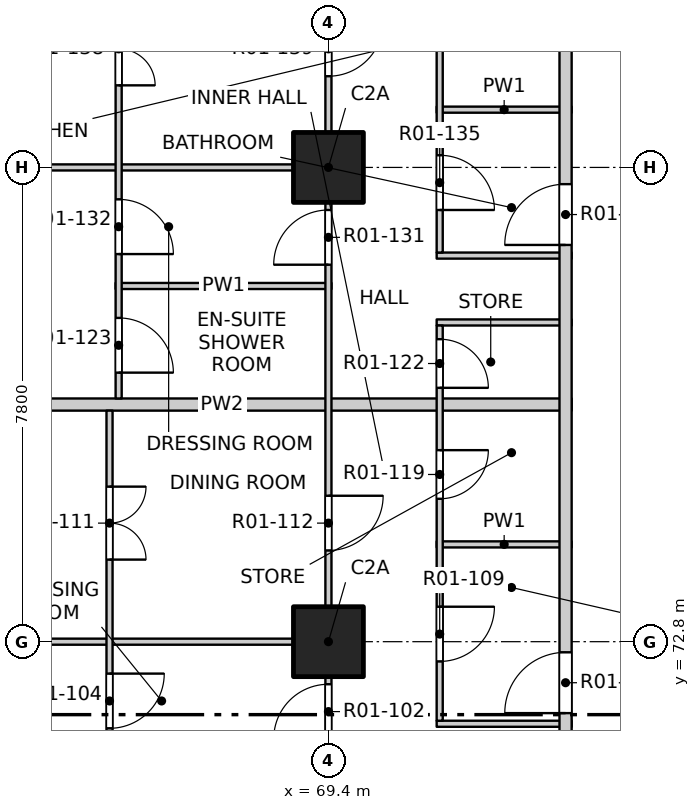
"""IFC4 building model, lengths in metres.
Left out: names, types, materials, properties, quantities, classifications, styles, units other than length and angle.
Written with IfcOpenShell. Run it as: python <this file> out.ifc"""

import sys

from ifc_helpers import new_model, si_unit, direction, frame, frame_2d, origin, origin_2d, place, context, subcontext, project, spatial, rectangle, extrude, element, fill, save


model = new_model("IFC4")
c1 = context("Model", 3, precision=1e-05, world=origin(), true_north=direction((0.0, 1.0)))
c2 = subcontext(c1, "Body", "Model", "MODEL_VIEW")
j1 = project(units=[si_unit("LENGTHUNIT", "METRE"), si_unit("PLANEANGLEUNIT", "RADIAN")], contexts=[c1])
p1 = place(None, origin())
s1 = spatial("IfcSite", under=j1, at=p1, CompositionType="ELEMENT")
p2 = place(p1, origin())
s2 = spatial("IfcBuilding", under=s1, at=p2, CompositionType="ELEMENT")
p3 = place(p2, frame((0.0, 0.0, 26.3)))
s3 = spatial("IfcBuildingStorey", under=s2, at=p3, CompositionType="ELEMENT", Elevation=26.3)
for number, where, z_axis, x_axis in (
    (1, (69.4, 72.8, -0.25), (0.0, 0.0, 1.0), (1.0, 0.0, 0.0)),
    (2, (69.4, 80.6, -0.25), (0.0, 0.0, 1.0), (1.0, 0.0, 0.0)),
):
    element("IfcColumn", number, at=place(p3, frame(where, z_axis=z_axis, x_axis=x_axis)), inside=s3, PredefinedType="COLUMN", context=c2, shape_type="SweptSolid", body=[
        extrude(rectangle(XDim=1.15, YDim=1.15, at=origin_2d()), origin(), (0.0, 0.0, 1.0), 3.4),
    ])
p4 = place(p3, frame((71.18, 71.45, 0.0), z_axis=(0.0, 0.0, 1.0), x_axis=(1.0, 0.0, 0.0)))
e3 = element("IfcWall", 3, at=p4, inside=s3, PredefinedType="PARTITIONING", context=c2, shape_type="SweptSolid", body=[
    extrude(rectangle(XDim=2.22, YDim=0.1, at=frame_2d((1.11, 0.0))), origin(), (0.0, 0.0, 1.0), 3.15),
])
p5 = place(p3, frame((61.9, 72.8, 0.0), z_axis=(0.0, 0.0, 1.0), x_axis=(1.0, 0.0, 0.0)))
e4 = element("IfcWall", 4, at=p5, inside=s3, PredefinedType="PARTITIONING", context=c2, shape_type="SweptSolid", body=[
    extrude(rectangle(XDim=7.55, YDim=0.1, at=frame_2d((3.775, 0.0))), origin(), (0.0, 0.0, 1.0), 2.55),
])
p6 = place(p3, frame((71.18, 74.4, 0.0), z_axis=(0.0, 0.0, 1.0), x_axis=(1.0, 0.0, 0.0)))
e5 = element("IfcWall", 5, at=p6, inside=s3, PredefinedType="PARTITIONING", context=c2, shape_type="SweptSolid", body=[
    extrude(rectangle(XDim=2.22, YDim=0.1, at=frame_2d((1.11, 0.0))), origin(), (0.0, 0.0, 1.0), 3.15),
])
p7 = place(p3, frame((61.9, 76.7, 0.0), z_axis=(0.0, 0.0, 1.0), x_axis=(1.0, 0.0, 0.0)))
e6 = element("IfcWall", 6, at=p7, inside=s3, PredefinedType="PARTITIONING", context=c2, shape_type="SweptSolid", body=[
    extrude(rectangle(XDim=11.5, YDim=0.2, at=frame_2d((5.75, 0.0))), origin(), (0.0, 0.0, 1.0), 3.15),
])
p8 = place(p3, frame((71.18, 78.05, 0.0), z_axis=(0.0, 0.0, 1.0), x_axis=(1.0, 0.0, 0.0)))
e7 = element("IfcWall", 7, at=p8, inside=s3, PredefinedType="PARTITIONING", context=c2, shape_type="SweptSolid", body=[
    extrude(rectangle(XDim=2.22, YDim=0.1, at=frame_2d((1.11, 0.0))), origin(), (0.0, 0.0, 1.0), 3.15),
])
p9 = place(p3, frame((65.9, 78.65, 0.0), z_axis=(0.0, 0.0, 1.0), x_axis=(1.0, 0.0, 0.0)))
e8 = element("IfcWall", 8, at=p9, inside=s3, PredefinedType="PARTITIONING", context=c2, shape_type="SweptSolid", body=[
    extrude(rectangle(XDim=3.55, YDim=0.1, at=frame_2d((1.775, 0.0))), origin(), (0.0, 0.0, 1.0), 3.15),
])
p10 = place(p3, frame((71.18, 79.15, 0.0), z_axis=(0.0, 0.0, 1.0), x_axis=(1.0, 0.0, 0.0)))
e9 = element("IfcWall", 9, at=p10, inside=s3, PredefinedType="PARTITIONING", context=c2, shape_type="SweptSolid", body=[
    extrude(rectangle(XDim=2.22, YDim=0.1, at=frame_2d((1.11, 0.0))), origin(), (0.0, 0.0, 1.0), 3.15),
])
p11 = place(p3, frame((61.9, 80.6, 0.0), z_axis=(0.0, 0.0, 1.0), x_axis=(1.0, 0.0, 0.0)))
e10 = element("IfcWall", 10, at=p11, inside=s3, PredefinedType="PARTITIONING", context=c2, shape_type="SweptSolid", body=[
    extrude(rectangle(XDim=7.55, YDim=0.1, at=frame_2d((3.775, 0.0))), origin(), (0.0, 0.0, 1.0), 2.55),
])
p12 = place(p3, frame((71.18, 81.55, 0.0), z_axis=(0.0, 0.0, 1.0), x_axis=(1.0, 0.0, 0.0)))
e11 = element("IfcWall", 11, at=p12, inside=s3, PredefinedType="PARTITIONING", context=c2, shape_type="SweptSolid", body=[
    extrude(rectangle(XDim=2.22, YDim=0.1, at=frame_2d((1.11, 0.0))), origin(), (0.0, 0.0, 1.0), 3.15),
])
p13 = place(p3, frame((65.8, 69.0, 0.0), z_axis=(0.0, 0.0, 1.0), x_axis=(0.0, 1.0, 0.0)))
e12 = element("IfcWall", 12, at=p13, inside=s3, PredefinedType="PARTITIONING", context=c2, shape_type="SweptSolid", body=[
    extrude(rectangle(XDim=7.6, YDim=0.1, at=frame_2d((3.8, 0.0))), origin(), (0.0, 0.0, 1.0), 3.15),
])
p14 = place(p13, frame((0.425, 0.0, 0.0)))
e13 = element("IfcOpeningElement", 13, at=p14, cuts=e12, PredefinedType="OPENING", context=c2, shape_type="SweptSolid", body=[
    extrude(rectangle(XDim=0.9, YDim=2.1, at=frame_2d((0.45, 1.05))), frame((0.0, 0.06, 0.0), z_axis=(0.0, -1.0, 0.0), x_axis=(1.0, 0.0, 0.0)), (0.0, 0.0, 1.0), 0.12),
])
p15 = place(p13, frame((2.375, 0.0, 0.0)))
e14 = element("IfcOpeningElement", 14, at=p15, cuts=e12, PredefinedType="OPENING", context=c2, shape_type="SweptSolid", body=[
    extrude(rectangle(XDim=0.9, YDim=2.1, at=frame_2d((0.45, 1.05))), frame((0.0, 0.06, 0.0), z_axis=(0.0, -1.0, 0.0), x_axis=(1.0, 0.0, 0.0)), (0.0, 0.0, 1.0), 0.12),
])
p16 = place(p13, frame((5.15, 0.0, 0.0)))
e15 = element("IfcOpeningElement", 15, at=p16, cuts=e12, PredefinedType="OPENING", context=c2, shape_type="SweptSolid", body=[
    extrude(rectangle(XDim=1.2, YDim=2.1, at=frame_2d((0.6, 1.05))), frame((0.0, 0.06, 0.0), z_axis=(0.0, -1.0, 0.0), x_axis=(1.0, 0.0, 0.0)), (0.0, 0.0, 1.0), 0.12),
])
p17 = place(p3, frame((65.95, 76.8, 0.0), z_axis=(0.0, 0.0, 1.0), x_axis=(0.0, 1.0, 0.0)))
e16 = element("IfcWall", 16, at=p17, inside=s3, PredefinedType="PARTITIONING", context=c2, shape_type="SweptSolid", body=[
    extrude(rectangle(XDim=11.3, YDim=0.1, at=frame_2d((5.65, 0.0))), origin(), (0.0, 0.0, 1.0), 3.15),
])
p18 = place(p17, frame((0.425, 0.0, 0.0)))
e17 = element("IfcOpeningElement", 17, at=p18, cuts=e16, PredefinedType="OPENING", context=c2, shape_type="SweptSolid", body=[
    extrude(rectangle(XDim=0.9, YDim=2.1, at=frame_2d((0.45, 1.05))), frame((0.0, 0.06, 0.0), z_axis=(0.0, -1.0, 0.0), x_axis=(1.0, 0.0, 0.0)), (0.0, 0.0, 1.0), 0.12),
])
p19 = place(p17, frame((2.375, 0.0, 0.0)))
e18 = element("IfcOpeningElement", 18, at=p19, cuts=e16, PredefinedType="OPENING", context=c2, shape_type="SweptSolid", body=[
    extrude(rectangle(XDim=0.9, YDim=2.1, at=frame_2d((0.45, 1.05))), frame((0.0, 0.06, 0.0), z_axis=(0.0, -1.0, 0.0), x_axis=(1.0, 0.0, 0.0)), (0.0, 0.0, 1.0), 0.12),
])
p20 = place(p17, frame((5.15, 0.0, 0.0)))
e19 = element("IfcOpeningElement", 19, at=p20, cuts=e16, PredefinedType="OPENING", context=c2, shape_type="SweptSolid", body=[
    extrude(rectangle(XDim=1.2, YDim=2.1, at=frame_2d((0.6, 1.05))), frame((0.0, 0.06, 0.0), z_axis=(0.0, -1.0, 0.0), x_axis=(1.0, 0.0, 0.0)), (0.0, 0.0, 1.0), 0.12),
])
p21 = place(p17, frame((9.05, 0.0, 0.0)))
e20 = element("IfcOpeningElement", 20, at=p21, cuts=e16, PredefinedType="OPENING", context=c2, shape_type="SweptSolid", body=[
    extrude(rectangle(XDim=1.2, YDim=2.1, at=frame_2d((0.6, 1.05))), frame((0.0, 0.06, 0.0), z_axis=(0.0, -1.0, 0.0), x_axis=(1.0, 0.0, 0.0)), (0.0, 0.0, 1.0), 0.12),
])
p22 = place(p3, frame((69.4, 49.4, 0.0), z_axis=(0.0, 0.0, 1.0), x_axis=(0.0, 1.0, 0.0)))
e21 = element("IfcWall", 21, at=p22, inside=s3, PredefinedType="PARTITIONING", context=c2, shape_type="SweptSolid", body=[
    extrude(rectangle(XDim=31.2, YDim=0.1, at=frame_2d((15.6, 0.0))), origin(), (0.0, 0.0, 1.0), 3.15),
])
p23 = place(p22, frame((1.5, 0.0, 0.0)))
e22 = element("IfcOpeningElement", 22, at=p23, cuts=e21, PredefinedType="OPENING", context=c2, shape_type="SweptSolid", body=[
    extrude(rectangle(XDim=0.9, YDim=2.1, at=frame_2d((0.45, 1.05))), frame((0.0, 0.06, 0.0), z_axis=(0.0, -1.0, 0.0), x_axis=(1.0, 0.0, 0.0)), (0.0, 0.0, 1.0), 0.12),
])
p24 = place(p22, frame((6.225, 0.0, 0.0)))
e23 = element("IfcOpeningElement", 23, at=p24, cuts=e21, PredefinedType="OPENING", context=c2, shape_type="SweptSolid", body=[
    extrude(rectangle(XDim=0.9, YDim=2.1, at=frame_2d((0.45, 1.05))), frame((0.0, 0.06, 0.0), z_axis=(0.0, -1.0, 0.0), x_axis=(1.0, 0.0, 0.0)), (0.0, 0.0, 1.0), 0.12),
])
p25 = place(p22, frame((10.275, 0.0, 0.0)))
e24 = element("IfcOpeningElement", 24, at=p25, cuts=e21, PredefinedType="OPENING", context=c2, shape_type="SweptSolid", body=[
    extrude(rectangle(XDim=0.9, YDim=2.1, at=frame_2d((0.45, 1.05))), frame((0.0, 0.06, 0.0), z_axis=(0.0, -1.0, 0.0), x_axis=(1.0, 0.0, 0.0)), (0.0, 0.0, 1.0), 0.12),
])
p26 = place(p22, frame((13.2, 0.0, 0.0)))
e25 = element("IfcOpeningElement", 25, at=p26, cuts=e21, PredefinedType="OPENING", context=c2, shape_type="SweptSolid", body=[
    extrude(rectangle(XDim=0.9, YDim=2.1, at=frame_2d((0.45, 1.05))), frame((0.0, 0.06, 0.0), z_axis=(0.0, -1.0, 0.0), x_axis=(1.0, 0.0, 0.0)), (0.0, 0.0, 1.0), 0.12),
])
p27 = place(p22, frame((18.075, 0.0, 0.0)))
e26 = element("IfcOpeningElement", 26, at=p27, cuts=e21, PredefinedType="OPENING", context=c2, shape_type="SweptSolid", body=[
    extrude(rectangle(XDim=0.9, YDim=2.1, at=frame_2d((0.45, 1.05))), frame((0.0, 0.06, 0.0), z_axis=(0.0, -1.0, 0.0), x_axis=(1.0, 0.0, 0.0)), (0.0, 0.0, 1.0), 0.12),
])
p28 = place(p22, frame((21.8, 0.0, 0.0)))
e27 = element("IfcOpeningElement", 27, at=p28, cuts=e21, PredefinedType="OPENING", context=c2, shape_type="SweptSolid", body=[
    extrude(rectangle(XDim=0.9, YDim=2.1, at=frame_2d((0.45, 1.05))), frame((0.0, 0.06, 0.0), z_axis=(0.0, -1.0, 0.0), x_axis=(1.0, 0.0, 0.0)), (0.0, 0.0, 1.0), 0.12),
])
p29 = place(p22, frame((24.9, 0.0, 0.0)))
e28 = element("IfcOpeningElement", 28, at=p29, cuts=e21, PredefinedType="OPENING", context=c2, shape_type="SweptSolid", body=[
    extrude(rectangle(XDim=0.9, YDim=2.1, at=frame_2d((0.45, 1.05))), frame((0.0, 0.06, 0.0), z_axis=(0.0, -1.0, 0.0), x_axis=(1.0, 0.0, 0.0)), (0.0, 0.0, 1.0), 0.12),
])
p30 = place(p22, frame((29.6, 0.0, 0.0)))
e29 = element("IfcOpeningElement", 29, at=p30, cuts=e21, PredefinedType="OPENING", context=c2, shape_type="SweptSolid", body=[
    extrude(rectangle(XDim=0.9, YDim=2.1, at=frame_2d((0.45, 1.05))), frame((0.0, 0.06, 0.0), z_axis=(0.0, -1.0, 0.0), x_axis=(1.0, 0.0, 0.0)), (0.0, 0.0, 1.0), 0.12),
])
p31 = place(p3, frame((69.4, 80.6, 0.0), z_axis=(0.0, 0.0, 1.0), x_axis=(0.0, 1.0, 0.0)))
e30 = element("IfcWall", 30, at=p31, inside=s3, PredefinedType="PARTITIONING", context=c2, shape_type="SweptSolid", body=[
    extrude(rectangle(XDim=7.5, YDim=0.1, at=frame_2d((3.75, 0.0))), origin(), (0.0, 0.0, 1.0), 2.55),
])
p32 = place(p31, frame((1.5, 0.0, 0.0)))
e31 = element("IfcOpeningElement", 31, at=p32, cuts=e30, PredefinedType="OPENING", context=c2, shape_type="SweptSolid", body=[
    extrude(rectangle(XDim=0.9, YDim=2.1, at=frame_2d((0.45, 1.05))), frame((0.0, 0.06, 0.0), z_axis=(0.0, -1.0, 0.0), x_axis=(1.0, 0.0, 0.0)), (0.0, 0.0, 1.0), 0.12),
])
p33 = place(p31, frame((5.4, 0.0, 0.0)))
e32 = element("IfcOpeningElement", 32, at=p33, cuts=e30, PredefinedType="OPENING", context=c2, shape_type="SweptSolid", body=[
    extrude(rectangle(XDim=0.9, YDim=2.1, at=frame_2d((0.45, 1.05))), frame((0.0, 0.06, 0.0), z_axis=(0.0, -1.0, 0.0), x_axis=(1.0, 0.0, 0.0)), (0.0, 0.0, 1.0), 0.12),
])
p34 = place(p3, frame((71.23, 71.5, 0.0), z_axis=(0.0, 0.0, 1.0), x_axis=(0.0, 1.0, 0.0)))
e33 = element("IfcWall", 33, at=p34, inside=s3, PredefinedType="PARTITIONING", context=c2, shape_type="SweptSolid", body=[
    extrude(rectangle(XDim=6.5, YDim=0.1, at=frame_2d((3.25, 0.0))), origin(), (0.0, 0.0, 1.0), 3.15),
])
p35 = place(p34, frame((0.975, 0.0, 0.0)))
e34 = element("IfcOpeningElement", 34, at=p35, cuts=e33, PredefinedType="OPENING", context=c2, shape_type="SweptSolid", body=[
    extrude(rectangle(XDim=0.9, YDim=2.1, at=frame_2d((0.45, 1.05))), frame((0.0, 0.06, 0.0), z_axis=(0.0, -1.0, 0.0), x_axis=(1.0, 0.0, 0.0)), (0.0, 0.0, 1.0), 0.12),
])
p36 = place(p34, frame((3.65, 0.0, 0.0)))
e35 = element("IfcOpeningElement", 35, at=p36, cuts=e33, PredefinedType="OPENING", context=c2, shape_type="SweptSolid", body=[
    extrude(rectangle(XDim=0.8, YDim=2.1, at=frame_2d((0.4, 1.05))), frame((0.0, 0.06, 0.0), z_axis=(0.0, -1.0, 0.0), x_axis=(1.0, 0.0, 0.0)), (0.0, 0.0, 1.0), 0.12),
])
p37 = place(p34, frame((5.475, 0.0, 0.0)))
e36 = element("IfcOpeningElement", 36, at=p37, cuts=e33, PredefinedType="OPENING", context=c2, shape_type="SweptSolid", body=[
    extrude(rectangle(XDim=0.8, YDim=2.1, at=frame_2d((0.4, 1.05))), frame((0.0, 0.06, 0.0), z_axis=(0.0, -1.0, 0.0), x_axis=(1.0, 0.0, 0.0)), (0.0, 0.0, 1.0), 0.12),
])
p38 = place(p3, frame((71.23, 79.2, 0.0), z_axis=(0.0, 0.0, 1.0), x_axis=(0.0, 1.0, 0.0)))
e37 = element("IfcWall", 37, at=p38, inside=s3, PredefinedType="PARTITIONING", context=c2, shape_type="SweptSolid", body=[
    extrude(rectangle(XDim=5.25, YDim=0.1, at=frame_2d((2.625, 0.0))), origin(), (0.0, 0.0, 1.0), 3.15),
])
p39 = place(p38, frame((0.7, 0.0, 0.0)))
e38 = element("IfcOpeningElement", 38, at=p39, cuts=e37, PredefinedType="OPENING", context=c2, shape_type="SweptSolid", body=[
    extrude(rectangle(XDim=0.9, YDim=2.1, at=frame_2d((0.45, 1.05))), frame((0.0, 0.06, 0.0), z_axis=(0.0, -1.0, 0.0), x_axis=(1.0, 0.0, 0.0)), (0.0, 0.0, 1.0), 0.12),
])
p40 = place(p38, frame((3.375, 0.0, 0.0)))
e39 = element("IfcOpeningElement", 39, at=p40, cuts=e37, PredefinedType="OPENING", context=c2, shape_type="SweptSolid", body=[
    extrude(rectangle(XDim=0.9, YDim=2.1, at=frame_2d((0.45, 1.05))), frame((0.0, 0.06, 0.0), z_axis=(0.0, -1.0, 0.0), x_axis=(1.0, 0.0, 0.0)), (0.0, 0.0, 1.0), 0.12),
])
p41 = place(p3, frame((73.3, 53.4, 0.0), z_axis=(0.0, 0.0, 1.0), x_axis=(0.0, 1.0, 0.0)))
e40 = element("IfcWall", 40, at=p41, inside=s3, PredefinedType="PARTITIONING", context=c2, shape_type="SweptSolid", body=[
    extrude(rectangle(XDim=31.0, YDim=0.2, at=frame_2d((15.5, 0.0))), origin(), (0.0, 0.0, 1.0), 3.15),
])
p42 = place(p41, frame((2.325, 0.0, 0.0)))
e41 = element("IfcOpeningElement", 41, at=p42, cuts=e40, PredefinedType="OPENING", context=c2, shape_type="SweptSolid", body=[
    extrude(rectangle(XDim=1.0, YDim=2.1, at=frame_2d((0.5, 1.05))), frame((0.0, 0.11, 0.0), z_axis=(0.0, -1.0, 0.0), x_axis=(1.0, 0.0, 0.0)), (0.0, 0.0, 1.0), 0.22),
])
p43 = place(p41, frame((10.725, 0.0, 0.0)))
e42 = element("IfcOpeningElement", 42, at=p43, cuts=e40, PredefinedType="OPENING", context=c2, shape_type="SweptSolid", body=[
    extrude(rectangle(XDim=1.0, YDim=2.1, at=frame_2d((0.5, 1.05))), frame((0.0, 0.11, 0.0), z_axis=(0.0, -1.0, 0.0), x_axis=(1.0, 0.0, 0.0)), (0.0, 0.0, 1.0), 0.22),
])
p44 = place(p41, frame((18.225, 0.0, 0.0)))
e43 = element("IfcOpeningElement", 43, at=p44, cuts=e40, PredefinedType="OPENING", context=c2, shape_type="SweptSolid", body=[
    extrude(rectangle(XDim=1.0, YDim=2.1, at=frame_2d((0.5, 1.05))), frame((0.0, 0.11, 0.0), z_axis=(0.0, -1.0, 0.0), x_axis=(1.0, 0.0, 0.0)), (0.0, 0.0, 1.0), 0.22),
])
p45 = place(p41, frame((25.925, 0.0, 0.0)))
e44 = element("IfcOpeningElement", 44, at=p45, cuts=e40, PredefinedType="OPENING", context=c2, shape_type="SweptSolid", body=[
    extrude(rectangle(XDim=1.0, YDim=2.1, at=frame_2d((0.5, 1.05))), frame((0.0, 0.11, 0.0), z_axis=(0.0, -1.0, 0.0), x_axis=(1.0, 0.0, 0.0)), (0.0, 0.0, 1.0), 0.22),
])
p46 = place(p28, origin())
e45 = element("IfcDoor", 45, at=p46, inside=s3, OperationType="SINGLE_SWING_LEFT", PredefinedType="DOOR", context=c2, shape_type="SweptSolid", body=[
    extrude(rectangle(XDim=0.9, YDim=2.1, at=frame_2d((0.45, 1.05))), frame((0.0, 0.025, 0.0), z_axis=(0.0, -1.0, 0.0), x_axis=(1.0, 0.0, 0.0)), (0.0, 0.0, 1.0), 0.05),
])
fill(e27, e45)
p47 = place(p15, origin())
e46 = element("IfcDoor", 46, at=p47, inside=s3, OperationType="SINGLE_SWING_LEFT", PredefinedType="DOOR", context=c2, shape_type="SweptSolid", body=[
    extrude(rectangle(XDim=0.9, YDim=2.1, at=frame_2d((0.45, 1.05))), frame((0.0, 0.025, 0.0), z_axis=(0.0, -1.0, 0.0), x_axis=(1.0, 0.0, 0.0)), (0.0, 0.0, 1.0), 0.05),
])
fill(e14, e46)
p48 = place(p44, origin())
e47 = element("IfcDoor", 47, at=p48, inside=s3, OperationType="SINGLE_SWING_RIGHT", PredefinedType="DOOR", context=c2, shape_type="SweptSolid", body=[
    extrude(rectangle(XDim=1.0, YDim=2.1, at=frame_2d((0.5, 1.05))), frame((0.0, 0.025, 0.0), z_axis=(0.0, -1.0, 0.0), x_axis=(1.0, 0.0, 0.0)), (0.0, 0.0, 1.0), 0.05),
])
fill(e43, e47)
p49 = place(p35, origin())
e48 = element("IfcDoor", 48, at=p49, inside=s3, OperationType="SINGLE_SWING_LEFT", PredefinedType="DOOR", context=c2, shape_type="SweptSolid", body=[
    extrude(rectangle(XDim=0.9, YDim=2.1, at=frame_2d((0.45, 1.05))), frame((0.0, 0.025, 0.0), z_axis=(0.0, -1.0, 0.0), x_axis=(1.0, 0.0, 0.0)), (0.0, 0.0, 1.0), 0.05),
])
fill(e34, e48)
p50 = place(p16, origin())
e49 = element("IfcDoor", 49, at=p50, inside=s3, OperationType="DOUBLE_DOOR_SINGLE_SWING", PredefinedType="DOOR", context=c2, shape_type="SweptSolid", body=[
    extrude(rectangle(XDim=1.2, YDim=2.1, at=frame_2d((0.6, 1.05))), frame((0.0, 0.025, 0.0), z_axis=(0.0, -1.0, 0.0), x_axis=(1.0, 0.0, 0.0)), (0.0, 0.0, 1.0), 0.05),
])
fill(e15, e49)
p51 = place(p29, origin())
e50 = element("IfcDoor", 50, at=p51, inside=s3, OperationType="SINGLE_SWING_LEFT", PredefinedType="DOOR", context=c2, shape_type="SweptSolid", body=[
    extrude(rectangle(XDim=0.9, YDim=2.1, at=frame_2d((0.45, 1.05))), frame((0.0, 0.025, 0.0), z_axis=(0.0, -1.0, 0.0), x_axis=(1.0, 0.0, 0.0)), (0.0, 0.0, 1.0), 0.05),
])
fill(e28, e50)
p52 = place(p36, origin())
e51 = element("IfcDoor", 51, at=p52, inside=s3, OperationType="SINGLE_SWING_LEFT", PredefinedType="DOOR", context=c2, shape_type="SweptSolid", body=[
    extrude(rectangle(XDim=0.8, YDim=2.1, at=frame_2d((0.4, 1.05))), frame((0.0, 0.025, 0.0), z_axis=(0.0, -1.0, 0.0), x_axis=(1.0, 0.0, 0.0)), (0.0, 0.0, 1.0), 0.05),
])
fill(e35, e51)
p53 = place(p37, origin())
e52 = element("IfcDoor", 52, at=p53, inside=s3, OperationType="SINGLE_SWING_RIGHT", PredefinedType="DOOR", context=c2, shape_type="SweptSolid", body=[
    extrude(rectangle(XDim=0.8, YDim=2.1, at=frame_2d((0.4, 1.05))), frame((0.0, 0.025, 0.0), z_axis=(0.0, -1.0, 0.0), x_axis=(1.0, 0.0, 0.0)), (0.0, 0.0, 1.0), 0.05),
])
fill(e36, e52)
p54 = place(p18, origin())
e53 = element("IfcDoor", 53, at=p54, inside=s3, OperationType="SINGLE_SWING_RIGHT", PredefinedType="DOOR", context=c2, shape_type="SweptSolid", body=[
    extrude(rectangle(XDim=0.9, YDim=2.1, at=frame_2d((0.45, 1.05))), frame((0.0, 0.025, 0.0), z_axis=(0.0, -1.0, 0.0), x_axis=(1.0, 0.0, 0.0)), (0.0, 0.0, 1.0), 0.05),
])
fill(e17, e53)
p55 = place(p30, origin())
e54 = element("IfcDoor", 54, at=p55, inside=s3, OperationType="SINGLE_SWING_LEFT", PredefinedType="DOOR", context=c2, shape_type="SweptSolid", body=[
    extrude(rectangle(XDim=0.9, YDim=2.1, at=frame_2d((0.45, 1.05))), frame((0.0, 0.025, 0.0), z_axis=(0.0, -1.0, 0.0), x_axis=(1.0, 0.0, 0.0)), (0.0, 0.0, 1.0), 0.05),
])
fill(e29, e54)
p56 = place(p19, origin())
e55 = element("IfcDoor", 55, at=p56, inside=s3, OperationType="SINGLE_SWING_RIGHT", PredefinedType="DOOR", context=c2, shape_type="SweptSolid", body=[
    extrude(rectangle(XDim=0.9, YDim=2.1, at=frame_2d((0.45, 1.05))), frame((0.0, 0.025, 0.0), z_axis=(0.0, -1.0, 0.0), x_axis=(1.0, 0.0, 0.0)), (0.0, 0.0, 1.0), 0.05),
])
fill(e18, e55)
p57 = place(p45, origin())
e56 = element("IfcDoor", 56, at=p57, inside=s3, OperationType="SINGLE_SWING_RIGHT", PredefinedType="DOOR", context=c2, shape_type="SweptSolid", body=[
    extrude(rectangle(XDim=1.0, YDim=2.1, at=frame_2d((0.5, 1.05))), frame((0.0, 0.025, 0.0), z_axis=(0.0, -1.0, 0.0), x_axis=(1.0, 0.0, 0.0)), (0.0, 0.0, 1.0), 0.05),
])
fill(e44, e56)
p58 = place(p39, origin())
e57 = element("IfcDoor", 57, at=p58, inside=s3, OperationType="SINGLE_SWING_RIGHT", PredefinedType="DOOR", context=c2, shape_type="SweptSolid", body=[
    extrude(rectangle(XDim=0.9, YDim=2.1, at=frame_2d((0.45, 1.05))), frame((0.0, 0.025, 0.0), z_axis=(0.0, -1.0, 0.0), x_axis=(1.0, 0.0, 0.0)), (0.0, 0.0, 1.0), 0.05),
])
fill(e38, e57)
p59 = place(p20, origin())
e58 = element("IfcDoor", 58, at=p59, inside=s3, OperationType="DOUBLE_DOOR_SINGLE_SWING", PredefinedType="DOOR", context=c2, shape_type="SweptSolid", body=[
    extrude(rectangle(XDim=1.2, YDim=2.1, at=frame_2d((0.6, 1.05))), frame((0.0, 0.025, 0.0), z_axis=(0.0, -1.0, 0.0), x_axis=(1.0, 0.0, 0.0)), (0.0, 0.0, 1.0), 0.05),
])
fill(e19, e58)
p60 = place(p32, origin())
e59 = element("IfcDoor", 59, at=p60, inside=s3, OperationType="SINGLE_SWING_LEFT", PredefinedType="DOOR", context=c2, shape_type="SweptSolid", body=[
    extrude(rectangle(XDim=0.9, YDim=2.1, at=frame_2d((0.45, 1.05))), frame((0.0, 0.025, 0.0), z_axis=(0.0, -1.0, 0.0), x_axis=(1.0, 0.0, 0.0)), (0.0, 0.0, 1.0), 0.05),
])
fill(e31, e59)
save(model, sys.argv[1])
